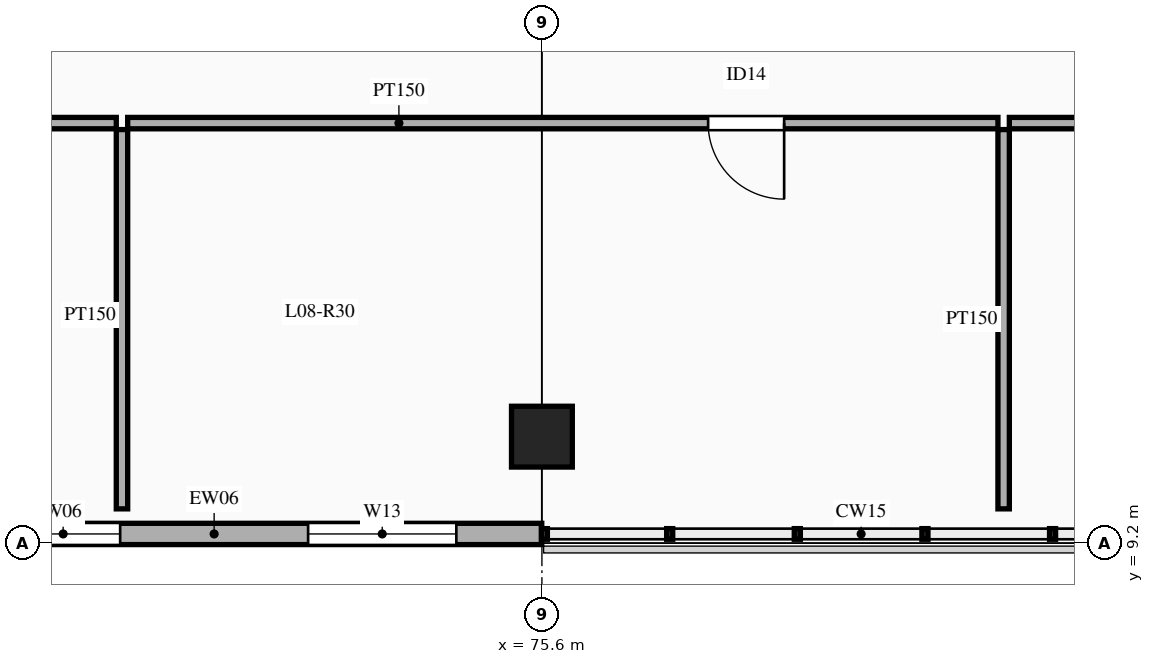
"""IFC4 building model, lengths in metres.
Left out: names, types, materials, properties, quantities, classifications, styles, units other than length and angle.
Written with IfcOpenShell. Run it as: python <this file> out.ifc"""

import sys

from ifc_helpers import new_model, si_unit, direction, frame, frame_2d, origin, origin_2d, place, context, subcontext, project, spatial, rectangle, extrude, element, fill, save


model = new_model("IFC4")
c1 = context("Model", 3, precision=1e-05, world=origin(), true_north=direction((0.0, 1.0)))
c2 = subcontext(c1, "Body", "Model", "MODEL_VIEW")
j1 = project(units=[si_unit("LENGTHUNIT", "METRE"), si_unit("PLANEANGLEUNIT", "RADIAN")], contexts=[c1])
p1 = place(None, origin())
s1 = spatial("IfcSite", under=j1, at=p1, CompositionType="ELEMENT")
p2 = place(p1, origin())
s2 = spatial("IfcBuilding", under=s1, at=p2, CompositionType="ELEMENT")
p3 = place(p2, frame((0.0, 0.0, 37.5)))
s3 = spatial("IfcBuildingStorey", under=s2, at=p3, CompositionType="ELEMENT", Elevation=37.5)
p4 = place(p3, frame((75.6, 10.6, 0.0), z_axis=(0.0, 0.0, 1.0), x_axis=(1.0, 0.0, 0.0)))
e1 = element("IfcColumn", 1, at=p4, inside=s3, PredefinedType="COLUMN", context=c2, shape_type="SweptSolid", body=[
    extrude(rectangle(XDim=0.8, YDim=0.8, at=origin_2d()), origin(), (0.0, 0.0, 1.0), 4.5),
])
p5 = place(p3, frame((67.202, 9.32, 0.0), z_axis=(0.0, 0.0, 1.0), x_axis=(1.0, 0.0, 0.0)))
e2 = element("IfcWall", 2, at=p5, inside=s3, PredefinedType="ELEMENTEDWALL", context=c2, shape_type="SweptSolid", body=[
    extrude(rectangle(XDim=8.396, YDim=0.28, at=frame_2d((4.198, 0.0))), origin(), (0.0, 0.0, 1.0), 3.55),
])
p6 = place(p5, frame((1.349, 0.0, 0.9)))
e3 = element("IfcOpeningElement", 3, at=p6, cuts=e2, PredefinedType="OPENING", context=c2, shape_type="SweptSolid", body=[
    extrude(rectangle(XDim=1.5, YDim=2.0, at=frame_2d((0.75, 1.0))), frame((0.0, 0.15, 0.0), z_axis=(0.0, -1.0, 0.0), x_axis=(1.0, 0.0, 0.0)), (0.0, 0.0, 1.0), 0.3),
])
p7 = place(p5, frame((5.322, 0.0, 0.9)))
e4 = element("IfcOpeningElement", 4, at=p7, cuts=e2, PredefinedType="OPENING", context=c2, shape_type="SweptSolid", body=[
    extrude(rectangle(XDim=1.95, YDim=2.0, at=frame_2d((0.975, 1.0))), frame((0.0, 0.15, 0.0), z_axis=(0.0, -1.0, 0.0), x_axis=(1.0, 0.0, 0.0)), (0.0, 0.0, 1.0), 0.3),
])
p8 = place(p3, frame((58.45, 14.725, 0.0), z_axis=(0.0, 0.0, 1.0), x_axis=(1.0, 0.0, 0.0)))
e5 = element("IfcWall", 5, at=p8, inside=s3, PredefinedType="PARTITIONING", context=c2, shape_type="SweptSolid", body=[
    extrude(rectangle(XDim=11.55, YDim=0.15, at=frame_2d((5.775, 0.0))), origin(), (0.0, 0.0, 1.0), 3.45),
])
p9 = place(p8, frame((5.2, 0.0, 0.0)))
e6 = element("IfcOpeningElement", 6, at=p9, cuts=e5, PredefinedType="OPENING", context=c2, shape_type="SweptSolid", body=[
    extrude(rectangle(XDim=1.0, YDim=2.15, at=frame_2d((0.5, 1.075))), frame((0.0, 0.085, 0.0), z_axis=(0.0, -1.0, 0.0), x_axis=(1.0, 0.0, 0.0)), (0.0, 0.0, 1.0), 0.17),
])
p10 = place(p3, frame((70.15, 14.725, 0.0), z_axis=(0.0, 0.0, 1.0), x_axis=(1.0, 0.0, 0.0)))
e7 = element("IfcWall", 7, at=p10, inside=s3, PredefinedType="PARTITIONING", context=c2, shape_type="SweptSolid", body=[
    extrude(rectangle(XDim=11.45, YDim=0.15, at=frame_2d((5.725, 0.0))), origin(), (0.0, 0.0, 1.0), 3.45),
])
p11 = place(p10, frame((7.637, 0.0, 0.0)))
e8 = element("IfcOpeningElement", 8, at=p11, cuts=e7, PredefinedType="OPENING", context=c2, shape_type="SweptSolid", body=[
    extrude(rectangle(XDim=1.0, YDim=2.15, at=frame_2d((0.5, 1.075))), frame((0.0, 0.085, 0.0), z_axis=(0.0, -1.0, 0.0), x_axis=(1.0, 0.0, 0.0)), (0.0, 0.0, 1.0), 0.17),
])
p12 = place(p3, frame((81.75, 14.725, 0.0), z_axis=(0.0, 0.0, 1.0), x_axis=(1.0, 0.0, 0.0)))
e9 = element("IfcWall", 9, at=p12, inside=s3, PredefinedType="PARTITIONING", context=c2, shape_type="SweptSolid", body=[
    extrude(rectangle(XDim=11.05, YDim=0.15, at=frame_2d((5.525, 0.0))), origin(), (0.0, 0.0, 1.0), 3.45),
])
p13 = place(p12, frame((5.025, 0.0, 0.0)))
e10 = element("IfcOpeningElement", 10, at=p13, cuts=e9, PredefinedType="OPENING", context=c2, shape_type="SweptSolid", body=[
    extrude(rectangle(XDim=1.0, YDim=2.15, at=frame_2d((0.5, 1.075))), frame((0.0, 0.085, 0.0), z_axis=(0.0, -1.0, 0.0), x_axis=(1.0, 0.0, 0.0)), (0.0, 0.0, 1.0), 0.17),
])
for number, where, z_axis, x_axis in (
    (11, (70.075, 9.65, 0.0), (0.0, 0.0, 1.0), (0.0, 1.0, 0.0)),
    (12, (81.675, 9.65, 0.0), (0.0, 0.0, 1.0), (0.0, 1.0, 0.0)),
):
    element("IfcWall", number, at=place(p3, frame(where, z_axis=z_axis, x_axis=x_axis)), inside=s3, PredefinedType="PARTITIONING", context=c2, shape_type="SweptSolid", body=[
        extrude(rectangle(XDim=4.99, YDim=0.15, at=frame_2d((2.495, 0.0))), origin(), (0.0, 0.0, 1.0), 3.45),
    ])
p14 = place(p6, origin())
e13 = element("IfcWindow", 13, at=p14, inside=s3, PartitioningType="DOUBLE_PANEL_VERTICAL", PredefinedType="WINDOW", context=c2, shape_type="SweptSolid", body=[
    extrude(rectangle(XDim=1.5, YDim=2.0, at=frame_2d((0.75, 1.0))), frame((0.0, 0.03, 0.0), z_axis=(0.0, -1.0, 0.0), x_axis=(1.0, 0.0, 0.0)), (0.0, 0.0, 1.0), 0.06),
])
fill(e3, e13)
p15 = place(p7, origin())
e14 = element("IfcWindow", 14, at=p15, inside=s3, PartitioningType="TRIPLE_PANEL_VERTICAL", PredefinedType="WINDOW", context=c2, shape_type="SweptSolid", body=[
    extrude(rectangle(XDim=1.95, YDim=2.0, at=frame_2d((0.975, 1.0))), frame((0.0, 0.03, 0.0), z_axis=(0.0, -1.0, 0.0), x_axis=(1.0, 0.0, 0.0)), (0.0, 0.0, 1.0), 0.06),
])
fill(e4, e14)
p16 = place(p11, frame((1.0, 0.0, 0.0), z_axis=(0.0, 0.0, 1.0), x_axis=(-1.0, 0.0, 0.0)))
e15 = element("IfcDoor", 15, at=p16, inside=s3, OperationType="SINGLE_SWING_LEFT", PredefinedType="DOOR", context=c2, shape_type="SweptSolid", body=[
    extrude(rectangle(XDim=1.0, YDim=2.15, at=frame_2d((0.5, 1.075))), frame((0.0, 0.025, 0.0), z_axis=(0.0, -1.0, 0.0), x_axis=(1.0, 0.0, 0.0)), (0.0, 0.0, 1.0), 0.05),
])
fill(e8, e15)
save(model, sys.argv[1])
